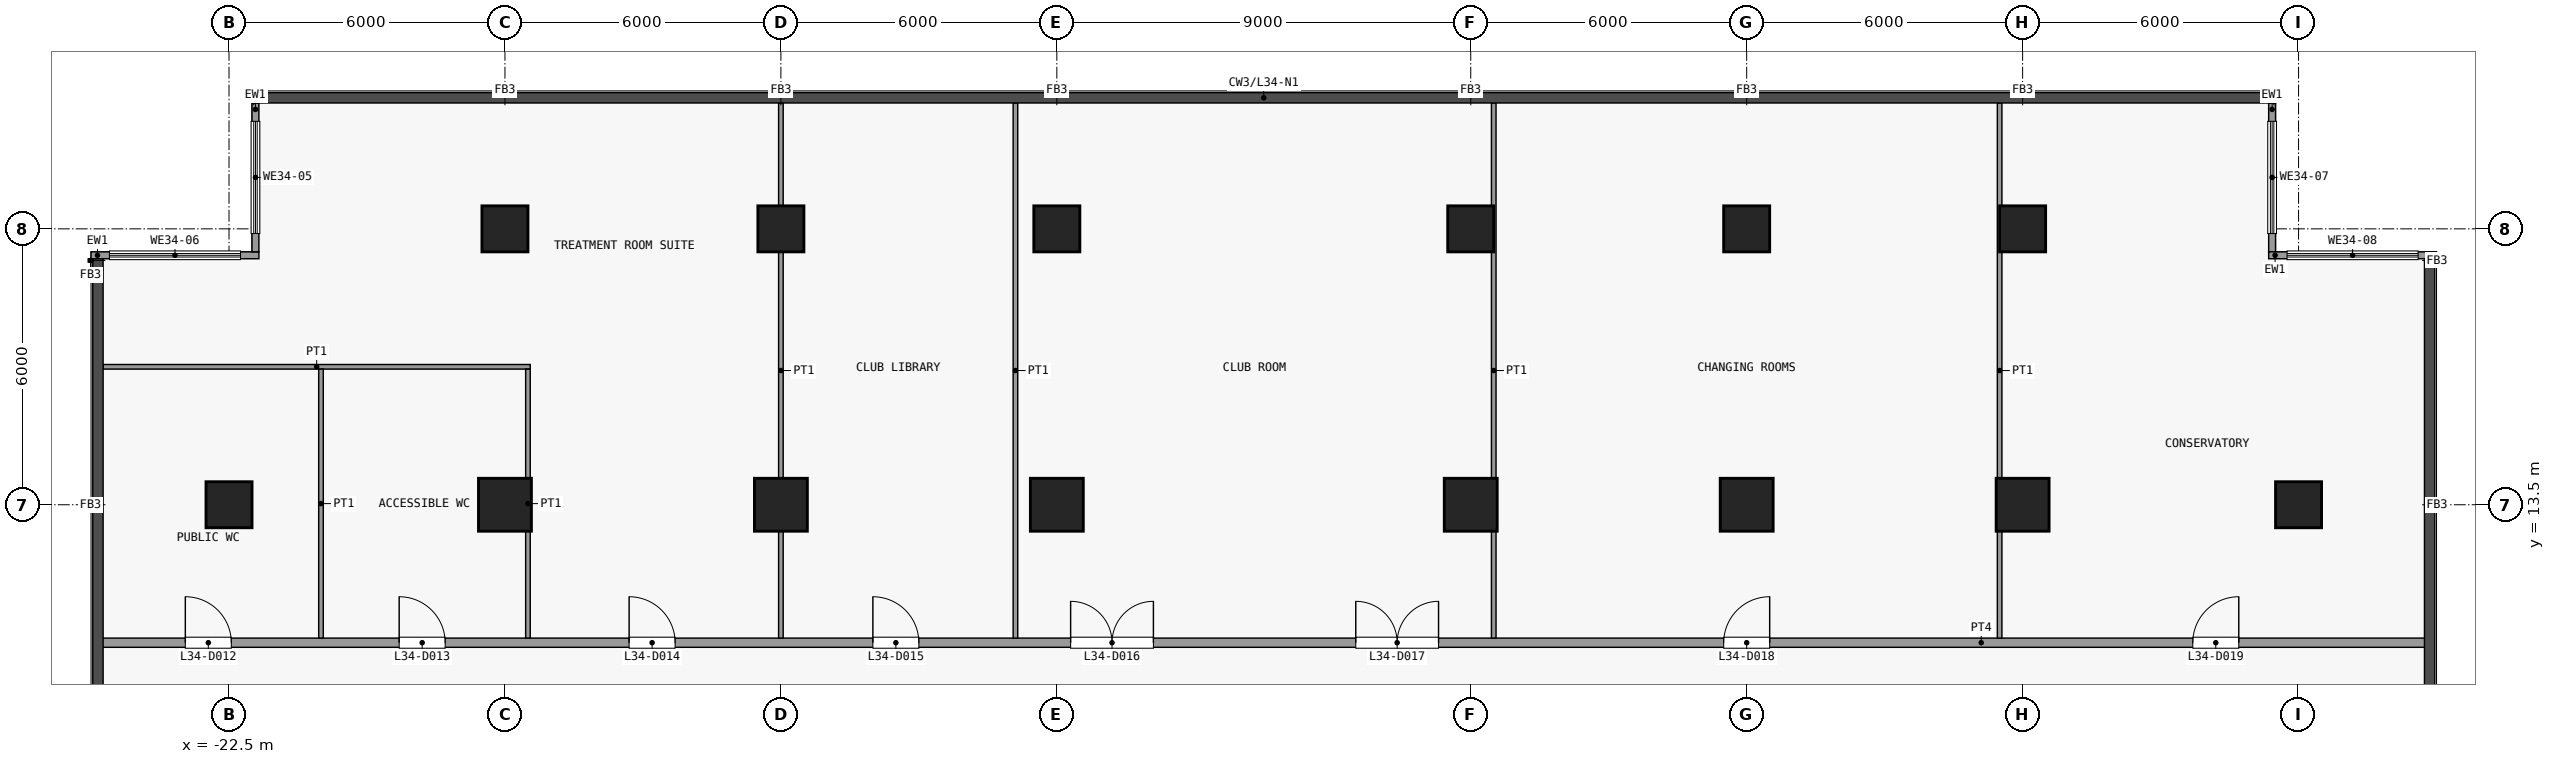
"""IFC4 building model, lengths in metres.
Left out: names, types, materials, properties, quantities, classifications, styles, units other than length and angle.
Written with IfcOpenShell. Run it as: python <this file> out.ifc"""

import sys

from ifc_helpers import new_model, si_unit, direction, frame, frame_2d, origin, origin_2d, place, context, subcontext, project, spatial, rectangle, extrude, element, fill, save


model = new_model("IFC4")
c1 = context("Model", 3, precision=1e-05, world=origin(), true_north=direction((0.0, 1.0)))
c2 = subcontext(c1, "Body", "Model", "MODEL_VIEW")
j1 = project(units=[si_unit("LENGTHUNIT", "METRE"), si_unit("PLANEANGLEUNIT", "RADIAN")], contexts=[c1])
p1 = place(None, origin())
s1 = spatial("IfcSite", under=j1, at=p1, CompositionType="ELEMENT")
p2 = place(p1, origin())
s2 = spatial("IfcBuilding", under=s1, at=p2, CompositionType="ELEMENT")
p3 = place(p2, frame((0.0, 0.0, 138.9)))
s3 = spatial("IfcBuildingStorey", under=s2, at=p3, CompositionType="ELEMENT", Elevation=138.9)
p4 = place(p3, frame((-22.5, 13.5, 0.0), z_axis=(0.0, 0.0, 1.0), x_axis=(1.0, 0.0, 0.0)))
e1 = element("IfcColumn", 1, at=p4, inside=s3, PredefinedType="COLUMN", context=c2, shape_type="SweptSolid", body=[
    extrude(rectangle(XDim=1.0, YDim=1.0, at=origin_2d()), origin(), (0.0, 0.0, 1.0), 5.0),
])
p5 = place(p3, frame((-16.5, 13.5, 0.0), z_axis=(0.0, 0.0, 1.0), x_axis=(1.0, 0.0, 0.0)))
e2 = element("IfcColumn", 2, at=p5, inside=s3, PredefinedType="COLUMN", context=c2, shape_type="SweptSolid", body=[
    extrude(rectangle(XDim=1.15, YDim=1.15, at=origin_2d()), origin(), (0.0, 0.0, 1.0), 5.0),
])
p6 = place(p3, frame((-16.5, 19.5, 0.0), z_axis=(0.0, 0.0, 1.0), x_axis=(1.0, 0.0, 0.0)))
e3 = element("IfcColumn", 3, at=p6, inside=s3, PredefinedType="COLUMN", context=c2, shape_type="SweptSolid", body=[
    extrude(rectangle(XDim=1.0, YDim=1.0, at=origin_2d()), origin(), (0.0, 0.0, 1.0), 5.0),
])
p7 = place(p3, frame((-10.5, 13.5, 0.0), z_axis=(0.0, 0.0, 1.0), x_axis=(1.0, 0.0, 0.0)))
e4 = element("IfcColumn", 4, at=p7, inside=s3, PredefinedType="COLUMN", context=c2, shape_type="SweptSolid", body=[
    extrude(rectangle(XDim=1.15, YDim=1.15, at=origin_2d()), origin(), (0.0, 0.0, 1.0), 5.0),
])
p8 = place(p3, frame((-10.5, 19.5, 0.0), z_axis=(0.0, 0.0, 1.0), x_axis=(1.0, 0.0, 0.0)))
e5 = element("IfcColumn", 5, at=p8, inside=s3, PredefinedType="COLUMN", context=c2, shape_type="SweptSolid", body=[
    extrude(rectangle(XDim=1.0, YDim=1.0, at=origin_2d()), origin(), (0.0, 0.0, 1.0), 5.0),
])
p9 = place(p3, frame((-4.5, 13.5, 0.0), z_axis=(0.0, 0.0, 1.0), x_axis=(1.0, 0.0, 0.0)))
e6 = element("IfcColumn", 6, at=p9, inside=s3, PredefinedType="COLUMN", context=c2, shape_type="SweptSolid", body=[
    extrude(rectangle(XDim=1.15, YDim=1.15, at=origin_2d()), origin(), (0.0, 0.0, 1.0), 5.0),
])
p10 = place(p3, frame((-4.5, 19.5, 0.0), z_axis=(0.0, 0.0, 1.0), x_axis=(1.0, 0.0, 0.0)))
e7 = element("IfcColumn", 7, at=p10, inside=s3, PredefinedType="COLUMN", context=c2, shape_type="SweptSolid", body=[
    extrude(rectangle(XDim=1.0, YDim=1.0, at=origin_2d()), origin(), (0.0, 0.0, 1.0), 5.0),
])
p11 = place(p3, frame((4.5, 13.5, 0.0), z_axis=(0.0, 0.0, 1.0), x_axis=(1.0, 0.0, 0.0)))
e8 = element("IfcColumn", 8, at=p11, inside=s3, PredefinedType="COLUMN", context=c2, shape_type="SweptSolid", body=[
    extrude(rectangle(XDim=1.15, YDim=1.15, at=origin_2d()), origin(), (0.0, 0.0, 1.0), 5.0),
])
p12 = place(p3, frame((4.5, 19.5, 0.0), z_axis=(0.0, 0.0, 1.0), x_axis=(1.0, 0.0, 0.0)))
e9 = element("IfcColumn", 9, at=p12, inside=s3, PredefinedType="COLUMN", context=c2, shape_type="SweptSolid", body=[
    extrude(rectangle(XDim=1.0, YDim=1.0, at=origin_2d()), origin(), (0.0, 0.0, 1.0), 5.0),
])
p13 = place(p3, frame((10.5, 13.5, 0.0), z_axis=(0.0, 0.0, 1.0), x_axis=(1.0, 0.0, 0.0)))
e10 = element("IfcColumn", 10, at=p13, inside=s3, PredefinedType="COLUMN", context=c2, shape_type="SweptSolid", body=[
    extrude(rectangle(XDim=1.15, YDim=1.15, at=origin_2d()), origin(), (0.0, 0.0, 1.0), 5.0),
])
p14 = place(p3, frame((10.5, 19.5, 0.0), z_axis=(0.0, 0.0, 1.0), x_axis=(1.0, 0.0, 0.0)))
e11 = element("IfcColumn", 11, at=p14, inside=s3, PredefinedType="COLUMN", context=c2, shape_type="SweptSolid", body=[
    extrude(rectangle(XDim=1.0, YDim=1.0, at=origin_2d()), origin(), (0.0, 0.0, 1.0), 5.0),
])
p15 = place(p3, frame((16.5, 13.5, 0.0), z_axis=(0.0, 0.0, 1.0), x_axis=(1.0, 0.0, 0.0)))
e12 = element("IfcColumn", 12, at=p15, inside=s3, PredefinedType="COLUMN", context=c2, shape_type="SweptSolid", body=[
    extrude(rectangle(XDim=1.15, YDim=1.15, at=origin_2d()), origin(), (0.0, 0.0, 1.0), 5.0),
])
for number, where, z_axis, x_axis in (
    (13, (16.5, 19.5, 0.0), (0.0, 0.0, 1.0), (1.0, 0.0, 0.0)),
    (14, (22.5, 13.5, 0.0), (0.0, 0.0, 1.0), (1.0, 0.0, 0.0)),
):
    element("IfcColumn", number, at=place(p3, frame(where, z_axis=z_axis, x_axis=x_axis)), inside=s3, PredefinedType="COLUMN", context=c2, shape_type="SweptSolid", body=[
        extrude(rectangle(XDim=1.0, YDim=1.0, at=origin_2d()), origin(), (0.0, 0.0, 1.0), 5.0),
    ])
p16 = place(p3, frame((-21.925, 19.0, 0.0), z_axis=(0.0, 0.0, 1.0), x_axis=(0.0, 1.0, 0.0)))
e15 = element("IfcWall", 15, at=p16, inside=s3, PredefinedType="SOLIDWALL", context=c2, shape_type="SweptSolid", body=[
    extrude(rectangle(XDim=3.238, YDim=0.15, at=frame_2d((1.619, 0.0))), origin(), (0.0, 0.0, 1.0), 4.55),
])
p17 = place(p16, frame((0.399, 0.0, 0.9)))
e16 = element("IfcOpeningElement", 16, at=p17, cuts=e15, PredefinedType="OPENING", context=c2, shape_type="SweptSolid", body=[
    extrude(rectangle(XDim=2.44, YDim=2.4, at=frame_2d((1.22, 1.2))), frame((0.0, 0.085, 0.0), z_axis=(0.0, -1.0, 0.0), x_axis=(1.0, 0.0, 0.0)), (0.0, 0.0, 1.0), 0.17),
])
p18 = place(p3, frame((-25.5, 18.925, 0.0), z_axis=(0.0, 0.0, 1.0), x_axis=(1.0, 0.0, 0.0)))
e17 = element("IfcWall", 17, at=p18, inside=s3, PredefinedType="SOLIDWALL", context=c2, shape_type="SweptSolid", body=[
    extrude(rectangle(XDim=3.65, YDim=0.15, at=frame_2d((1.825, 0.0))), origin(), (0.0, 0.0, 1.0), 4.55),
])
p19 = place(p18, frame((0.4, 0.0, 0.9)))
e18 = element("IfcOpeningElement", 18, at=p19, cuts=e17, PredefinedType="OPENING", context=c2, shape_type="SweptSolid", body=[
    extrude(rectangle(XDim=2.85, YDim=2.4, at=frame_2d((1.425, 1.2))), frame((0.0, 0.085, 0.0), z_axis=(0.0, -1.0, 0.0), x_axis=(1.0, 0.0, 0.0)), (0.0, 0.0, 1.0), 0.17),
])
p20 = place(p3, frame((21.925, 22.238, 0.0), z_axis=(0.0, 0.0, 1.0), x_axis=(0.0, -1.0, 0.0)))
e19 = element("IfcWall", 19, at=p20, inside=s3, PredefinedType="SOLIDWALL", context=c2, shape_type="SweptSolid", body=[
    extrude(rectangle(XDim=3.238, YDim=0.15, at=frame_2d((1.619, 0.0))), origin(), (0.0, 0.0, 1.0), 4.55),
])
p21 = place(p20, frame((0.399, 0.0, 0.9)))
e20 = element("IfcOpeningElement", 20, at=p21, cuts=e19, PredefinedType="OPENING", context=c2, shape_type="SweptSolid", body=[
    extrude(rectangle(XDim=2.44, YDim=2.4, at=frame_2d((1.22, 1.2))), frame((0.0, 0.085, 0.0), z_axis=(0.0, -1.0, 0.0), x_axis=(1.0, 0.0, 0.0)), (0.0, 0.0, 1.0), 0.17),
])
p22 = place(p3, frame((21.85, 18.925, 0.0), z_axis=(0.0, 0.0, 1.0), x_axis=(1.0, 0.0, 0.0)))
e21 = element("IfcWall", 21, at=p22, inside=s3, PredefinedType="SOLIDWALL", context=c2, shape_type="SweptSolid", body=[
    extrude(rectangle(XDim=3.65, YDim=0.15, at=frame_2d((1.825, 0.0))), origin(), (0.0, 0.0, 1.0), 4.55),
])
p23 = place(p22, frame((0.4, 0.0, 0.9)))
e22 = element("IfcOpeningElement", 22, at=p23, cuts=e21, PredefinedType="OPENING", context=c2, shape_type="SweptSolid", body=[
    extrude(rectangle(XDim=2.85, YDim=2.4, at=frame_2d((1.425, 1.2))), frame((0.0, 0.085, 0.0), z_axis=(0.0, -1.0, 0.0), x_axis=(1.0, 0.0, 0.0)), (0.0, 0.0, 1.0), 0.17),
])
p24 = place(p3, frame((-25.35, 10.5, 0.0), z_axis=(0.0, 0.0, 1.0), x_axis=(1.0, 0.0, 0.0)))
e23 = element("IfcWall", 23, at=p24, inside=s3, PredefinedType="PARTITIONING", context=c2, shape_type="SweptSolid", body=[
    extrude(rectangle(XDim=50.7, YDim=0.2, at=frame_2d((25.35, 0.0))), origin(), (0.0, 0.0, 1.0), 4.55),
])
p25 = place(p24, frame((1.9, 0.0, 0.0)))
e24 = element("IfcOpeningElement", 24, at=p25, cuts=e23, PredefinedType="OPENING", context=c2, shape_type="SweptSolid", body=[
    extrude(rectangle(XDim=1.0, YDim=2.1, at=frame_2d((0.5, 1.05))), frame((0.0, 0.11, 0.0), z_axis=(0.0, -1.0, 0.0), x_axis=(1.0, 0.0, 0.0)), (0.0, 0.0, 1.0), 0.22),
])
p26 = place(p24, frame((6.55, 0.0, 0.0)))
e25 = element("IfcOpeningElement", 25, at=p26, cuts=e23, PredefinedType="OPENING", context=c2, shape_type="SweptSolid", body=[
    extrude(rectangle(XDim=1.0, YDim=2.1, at=frame_2d((0.5, 1.05))), frame((0.0, 0.11, 0.0), z_axis=(0.0, -1.0, 0.0), x_axis=(1.0, 0.0, 0.0)), (0.0, 0.0, 1.0), 0.22),
])
p27 = place(p24, frame((11.55, 0.0, 0.0)))
e26 = element("IfcOpeningElement", 26, at=p27, cuts=e23, PredefinedType="OPENING", context=c2, shape_type="SweptSolid", body=[
    extrude(rectangle(XDim=1.0, YDim=2.1, at=frame_2d((0.5, 1.05))), frame((0.0, 0.11, 0.0), z_axis=(0.0, -1.0, 0.0), x_axis=(1.0, 0.0, 0.0)), (0.0, 0.0, 1.0), 0.22),
])
p28 = place(p24, frame((16.85, 0.0, 0.0)))
e27 = element("IfcOpeningElement", 27, at=p28, cuts=e23, PredefinedType="OPENING", context=c2, shape_type="SweptSolid", body=[
    extrude(rectangle(XDim=1.0, YDim=2.1, at=frame_2d((0.5, 1.05))), frame((0.0, 0.11, 0.0), z_axis=(0.0, -1.0, 0.0), x_axis=(1.0, 0.0, 0.0)), (0.0, 0.0, 1.0), 0.22),
])
p29 = place(p24, frame((21.15, 0.0, 0.0)))
e28 = element("IfcOpeningElement", 28, at=p29, cuts=e23, PredefinedType="OPENING", context=c2, shape_type="SweptSolid", body=[
    extrude(rectangle(XDim=1.8, YDim=2.1, at=frame_2d((0.9, 1.05))), frame((0.0, 0.11, 0.0), z_axis=(0.0, -1.0, 0.0), x_axis=(1.0, 0.0, 0.0)), (0.0, 0.0, 1.0), 0.22),
])
p30 = place(p24, frame((27.35, 0.0, 0.0)))
e29 = element("IfcOpeningElement", 29, at=p30, cuts=e23, PredefinedType="OPENING", context=c2, shape_type="SweptSolid", body=[
    extrude(rectangle(XDim=1.8, YDim=2.1, at=frame_2d((0.9, 1.05))), frame((0.0, 0.11, 0.0), z_axis=(0.0, -1.0, 0.0), x_axis=(1.0, 0.0, 0.0)), (0.0, 0.0, 1.0), 0.22),
])
p31 = place(p24, frame((35.35, 0.0, 0.0)))
e30 = element("IfcOpeningElement", 30, at=p31, cuts=e23, PredefinedType="OPENING", context=c2, shape_type="SweptSolid", body=[
    extrude(rectangle(XDim=1.0, YDim=2.1, at=frame_2d((0.5, 1.05))), frame((0.0, 0.11, 0.0), z_axis=(0.0, -1.0, 0.0), x_axis=(1.0, 0.0, 0.0)), (0.0, 0.0, 1.0), 0.22),
])
p32 = place(p24, frame((45.55, 0.0, 0.0)))
e31 = element("IfcOpeningElement", 31, at=p32, cuts=e23, PredefinedType="OPENING", context=c2, shape_type="SweptSolid", body=[
    extrude(rectangle(XDim=1.0, YDim=2.1, at=frame_2d((0.5, 1.05))), frame((0.0, 0.11, 0.0), z_axis=(0.0, -1.0, 0.0), x_axis=(1.0, 0.0, 0.0)), (0.0, 0.0, 1.0), 0.22),
])
p33 = place(p3, frame((-25.238, 16.5, 0.0), z_axis=(0.0, 0.0, 1.0), x_axis=(1.0, 0.0, 0.0)))
e32 = element("IfcWall", 32, at=p33, inside=s3, PredefinedType="PARTITIONING", context=c2, shape_type="SweptSolid", body=[
    extrude(rectangle(XDim=9.288, YDim=0.1, at=frame_2d((4.644, 0.0))), origin(), (0.0, 0.0, 1.0), 4.55),
])
for number, where, z_axis, x_axis in (
    (33, (-20.5, 10.6, 0.0), (0.0, 0.0, 1.0), (0.0, 1.0, 0.0)),
    (34, (-16.0, 10.6, 0.0), (0.0, 0.0, 1.0), (0.0, 1.0, 0.0)),
):
    element("IfcWall", number, at=place(p3, frame(where, z_axis=z_axis, x_axis=x_axis)), inside=s3, PredefinedType="PARTITIONING", context=c2, shape_type="SweptSolid", body=[
        extrude(rectangle(XDim=5.85, YDim=0.1, at=frame_2d((2.925, 0.0))), origin(), (0.0, 0.0, 1.0), 4.55),
    ])
for number, where, z_axis, x_axis in (
    (35, (-10.5, 10.6, 0.0), (0.0, 0.0, 1.0), (0.0, 1.0, 0.0)),
    (36, (-5.4, 10.6, 0.0), (0.0, 0.0, 1.0), (0.0, 1.0, 0.0)),
    (37, (5.0, 10.6, 0.0), (0.0, 0.0, 1.0), (0.0, 1.0, 0.0)),
    (38, (16.0, 10.6, 0.0), (0.0, 0.0, 1.0), (0.0, 1.0, 0.0)),
):
    element("IfcWall", number, at=place(p3, frame(where, z_axis=z_axis, x_axis=x_axis)), inside=s3, PredefinedType="PARTITIONING", context=c2, shape_type="SweptSolid", body=[
        extrude(rectangle(XDim=11.637, YDim=0.1, at=frame_2d((5.819, 0.0))), origin(), (0.0, 0.0, 1.0), 4.55),
    ])
p34 = place(p17, origin())
e39 = element("IfcWindow", 39, at=p34, inside=s3, PartitioningType="SINGLE_PANEL", PredefinedType="WINDOW", context=c2, shape_type="SweptSolid", body=[
    extrude(rectangle(XDim=2.44, YDim=2.4, at=frame_2d((1.22, 1.2))), frame((0.0, 0.03, 0.0), z_axis=(0.0, -1.0, 0.0), x_axis=(1.0, 0.0, 0.0)), (0.0, 0.0, 1.0), 0.06),
])
fill(e16, e39)
p35 = place(p19, origin())
e40 = element("IfcWindow", 40, at=p35, inside=s3, PartitioningType="SINGLE_PANEL", PredefinedType="WINDOW", context=c2, shape_type="SweptSolid", body=[
    extrude(rectangle(XDim=2.85, YDim=2.4, at=frame_2d((1.425, 1.2))), frame((0.0, 0.03, 0.0), z_axis=(0.0, -1.0, 0.0), x_axis=(1.0, 0.0, 0.0)), (0.0, 0.0, 1.0), 0.06),
])
fill(e18, e40)
p36 = place(p21, origin())
e41 = element("IfcWindow", 41, at=p36, inside=s3, PartitioningType="SINGLE_PANEL", PredefinedType="WINDOW", context=c2, shape_type="SweptSolid", body=[
    extrude(rectangle(XDim=2.44, YDim=2.4, at=frame_2d((1.22, 1.2))), frame((0.0, 0.03, 0.0), z_axis=(0.0, -1.0, 0.0), x_axis=(1.0, 0.0, 0.0)), (0.0, 0.0, 1.0), 0.06),
])
fill(e20, e41)
p37 = place(p23, origin())
e42 = element("IfcWindow", 42, at=p37, inside=s3, PartitioningType="SINGLE_PANEL", PredefinedType="WINDOW", context=c2, shape_type="SweptSolid", body=[
    extrude(rectangle(XDim=2.85, YDim=2.4, at=frame_2d((1.425, 1.2))), frame((0.0, 0.03, 0.0), z_axis=(0.0, -1.0, 0.0), x_axis=(1.0, 0.0, 0.0)), (0.0, 0.0, 1.0), 0.06),
])
fill(e22, e42)
p38 = place(p25, origin())
e43 = element("IfcDoor", 43, at=p38, inside=s3, OperationType="SINGLE_SWING_RIGHT", PredefinedType="DOOR", context=c2, shape_type="SweptSolid", body=[
    extrude(rectangle(XDim=1.0, YDim=2.1, at=frame_2d((0.5, 1.05))), frame((0.0, 0.025, 0.0), z_axis=(0.0, -1.0, 0.0), x_axis=(1.0, 0.0, 0.0)), (0.0, 0.0, 1.0), 0.05),
])
fill(e24, e43)
p39 = place(p26, origin())
e44 = element("IfcDoor", 44, at=p39, inside=s3, OperationType="SINGLE_SWING_RIGHT", PredefinedType="DOOR", context=c2, shape_type="SweptSolid", body=[
    extrude(rectangle(XDim=1.0, YDim=2.1, at=frame_2d((0.5, 1.05))), frame((0.0, 0.025, 0.0), z_axis=(0.0, -1.0, 0.0), x_axis=(1.0, 0.0, 0.0)), (0.0, 0.0, 1.0), 0.05),
])
fill(e25, e44)
p40 = place(p27, origin())
e45 = element("IfcDoor", 45, at=p40, inside=s3, OperationType="SINGLE_SWING_RIGHT", PredefinedType="DOOR", context=c2, shape_type="SweptSolid", body=[
    extrude(rectangle(XDim=1.0, YDim=2.1, at=frame_2d((0.5, 1.05))), frame((0.0, 0.025, 0.0), z_axis=(0.0, -1.0, 0.0), x_axis=(1.0, 0.0, 0.0)), (0.0, 0.0, 1.0), 0.05),
])
fill(e26, e45)
p41 = place(p28, origin())
e46 = element("IfcDoor", 46, at=p41, inside=s3, OperationType="SINGLE_SWING_RIGHT", PredefinedType="DOOR", context=c2, shape_type="SweptSolid", body=[
    extrude(rectangle(XDim=1.0, YDim=2.1, at=frame_2d((0.5, 1.05))), frame((0.0, 0.025, 0.0), z_axis=(0.0, -1.0, 0.0), x_axis=(1.0, 0.0, 0.0)), (0.0, 0.0, 1.0), 0.05),
])
fill(e27, e46)
p42 = place(p29, origin())
e47 = element("IfcDoor", 47, at=p42, inside=s3, OperationType="DOUBLE_DOOR_SINGLE_SWING", PredefinedType="DOOR", context=c2, shape_type="SweptSolid", body=[
    extrude(rectangle(XDim=1.8, YDim=2.1, at=frame_2d((0.9, 1.05))), frame((0.0, 0.025, 0.0), z_axis=(0.0, -1.0, 0.0), x_axis=(1.0, 0.0, 0.0)), (0.0, 0.0, 1.0), 0.05),
])
fill(e28, e47)
p43 = place(p30, origin())
e48 = element("IfcDoor", 48, at=p43, inside=s3, OperationType="DOUBLE_DOOR_SINGLE_SWING", PredefinedType="DOOR", context=c2, shape_type="SweptSolid", body=[
    extrude(rectangle(XDim=1.8, YDim=2.1, at=frame_2d((0.9, 1.05))), frame((0.0, 0.025, 0.0), z_axis=(0.0, -1.0, 0.0), x_axis=(1.0, 0.0, 0.0)), (0.0, 0.0, 1.0), 0.05),
])
fill(e29, e48)
p44 = place(p31, origin())
e49 = element("IfcDoor", 49, at=p44, inside=s3, OperationType="SINGLE_SWING_LEFT", PredefinedType="DOOR", context=c2, shape_type="SweptSolid", body=[
    extrude(rectangle(XDim=1.0, YDim=2.1, at=frame_2d((0.5, 1.05))), frame((0.0, 0.025, 0.0), z_axis=(0.0, -1.0, 0.0), x_axis=(1.0, 0.0, 0.0)), (0.0, 0.0, 1.0), 0.05),
])
fill(e30, e49)
p45 = place(p32, origin())
e50 = element("IfcDoor", 50, at=p45, inside=s3, OperationType="SINGLE_SWING_LEFT", PredefinedType="DOOR", context=c2, shape_type="SweptSolid", body=[
    extrude(rectangle(XDim=1.0, YDim=2.1, at=frame_2d((0.5, 1.05))), frame((0.0, 0.025, 0.0), z_axis=(0.0, -1.0, 0.0), x_axis=(1.0, 0.0, 0.0)), (0.0, 0.0, 1.0), 0.05),
])
fill(e31, e50)
save(model, sys.argv[1])
